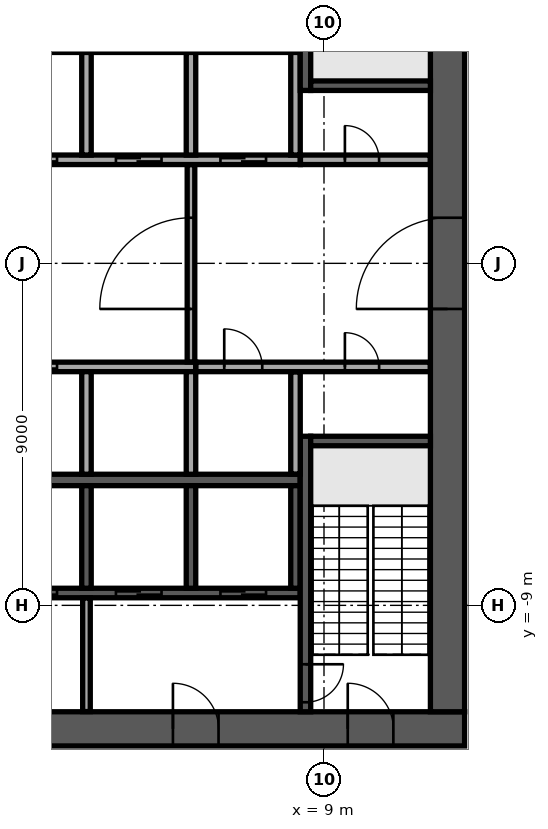
"""IFC4 building model, lengths in metres.
Left out: names, types, materials, properties, quantities, classifications, styles, units other than length and angle.
Written with IfcOpenShell. Run it as: python <this file> out.ifc"""

import sys

from ifc_helpers import new_model, si_unit, direction, frame, frame_2d, origin, place, context, subcontext, project, spatial, rectangle, extrude, element, fill, save


model = new_model("IFC4")
c1 = context("Model", 3, precision=1e-05, world=origin(), true_north=direction((0.0, 1.0)))
c2 = subcontext(c1, "Body", "Model", "MODEL_VIEW")
j1 = project(units=[si_unit("LENGTHUNIT", "METRE"), si_unit("PLANEANGLEUNIT", "RADIAN")], contexts=[c1])
p1 = place(None, origin())
s1 = spatial("IfcSite", under=j1, at=p1, CompositionType="ELEMENT")
p2 = place(p1, origin())
s2 = spatial("IfcBuilding", under=s1, at=p2, CompositionType="ELEMENT")
p3 = place(p2, frame((0.0, 0.0, 237.3)))
s3 = spatial("IfcBuildingStorey", under=s2, at=p3, CompositionType="ELEMENT", Elevation=237.3)
p4 = place(p3, frame((-12.7, -12.25, 0.0), z_axis=(0.0, 0.0, 1.0), x_axis=(1.0, 0.0, 0.0)))
e1 = element("IfcWall", 1, at=p4, inside=s3, PredefinedType="SHEAR", context=c2, shape_type="SweptSolid", body=[
    extrude(rectangle(XDim=25.4, YDim=0.9, at=frame_2d((12.7, 0.0))), origin(), (0.0, 0.0, 1.0), 5.24),
])
p5 = place(p4, frame((7.6, 0.0, 0.0)))
e2 = element("IfcOpeningElement", 2, at=p5, cuts=e1, PredefinedType="OPENING", context=c2, shape_type="SweptSolid", body=[
    extrude(rectangle(XDim=2.0, YDim=2.1, at=frame_2d((1.0, 1.05))), frame((0.0, 0.46, 0.0), z_axis=(0.0, -1.0, 0.0), x_axis=(1.0, 0.0, 0.0)), (0.0, 0.0, 1.0), 0.92),
])
p6 = place(p4, frame((17.725, 0.0, 0.0)))
e3 = element("IfcOpeningElement", 3, at=p6, cuts=e1, PredefinedType="OPENING", context=c2, shape_type="SweptSolid", body=[
    extrude(rectangle(XDim=1.2, YDim=2.1, at=frame_2d((0.6, 1.05))), frame((0.0, 0.46, 0.0), z_axis=(0.0, -1.0, 0.0), x_axis=(1.0, 0.0, 0.0)), (0.0, 0.0, 1.0), 0.92),
])
p7 = place(p4, frame((1.875, 0.0, 0.0)))
e4 = element("IfcOpeningElement", 4, at=p7, cuts=e1, PredefinedType="OPENING", context=c2, shape_type="SweptSolid", body=[
    extrude(rectangle(XDim=1.2, YDim=2.1, at=frame_2d((0.6, 1.05))), frame((0.0, 0.46, 0.0), z_axis=(0.0, -1.0, 0.0), x_axis=(1.0, 0.0, 0.0)), (0.0, 0.0, 1.0), 0.92),
])
p8 = place(p4, frame((22.325, 0.0, 0.0)))
e5 = element("IfcOpeningElement", 5, at=p8, cuts=e1, PredefinedType="OPENING", context=c2, shape_type="SweptSolid", body=[
    extrude(rectangle(XDim=1.2, YDim=2.1, at=frame_2d((0.6, 1.05))), frame((0.0, 0.46, 0.0), z_axis=(0.0, -1.0, 0.0), x_axis=(1.0, 0.0, 0.0)), (0.0, 0.0, 1.0), 0.92),
])
p9 = place(p3, frame((12.25, -11.8, 0.0), z_axis=(0.0, 0.0, 1.0), x_axis=(0.0, 1.0, 0.0)))
e6 = element("IfcWall", 6, at=p9, inside=s3, PredefinedType="SHEAR", context=c2, shape_type="SweptSolid", body=[
    extrude(rectangle(XDim=23.6, YDim=0.9, at=frame_2d((11.8, 0.0))), origin(), (0.0, 0.0, 1.0), 5.24),
])
p10 = place(p9, frame((10.6, 0.0, 0.0)))
e7 = element("IfcOpeningElement", 7, at=p10, cuts=e6, PredefinedType="OPENING", context=c2, shape_type="SweptSolid", body=[
    extrude(rectangle(XDim=2.4, YDim=2.4, at=frame_2d((1.2, 1.2))), frame((0.0, 0.46, 0.0), z_axis=(0.0, -1.0, 0.0), x_axis=(1.0, 0.0, 0.0)), (0.0, 0.0, 1.0), 0.92),
])
p11 = place(p3, frame((-8.375, 5.7, 0.0), z_axis=(0.0, 0.0, 1.0), x_axis=(1.0, 0.0, 0.0)))
e8 = element("IfcWall", 8, at=p11, inside=s3, PredefinedType="SOLIDWALL", context=c2, shape_type="SweptSolid", body=[
    extrude(rectangle(XDim=16.75, YDim=0.3, at=frame_2d((8.375, 0.0))), origin(), (0.0, 0.0, 1.0), 5.24),
])
p12 = place(p3, frame((-2.875, -5.7, 0.0), z_axis=(0.0, 0.0, 1.0), x_axis=(1.0, 0.0, 0.0)))
e9 = element("IfcWall", 9, at=p12, inside=s3, PredefinedType="SOLIDWALL", context=c2, shape_type="SweptSolid", body=[
    extrude(rectangle(XDim=11.25, YDim=0.3, at=frame_2d((5.625, 0.0))), origin(), (0.0, 0.0, 1.0), 5.24),
])
p13 = place(p3, frame((-8.375, 2.725, 0.0), z_axis=(0.0, 0.0, 1.0), x_axis=(1.0, 0.0, 0.0)))
e10 = element("IfcWall", 10, at=p13, inside=s3, PredefinedType="SOLIDWALL", context=c2, shape_type="SweptSolid", body=[
    extrude(rectangle(XDim=16.75, YDim=0.25, at=frame_2d((8.375, 0.0))), origin(), (0.0, 0.0, 1.0), 5.24),
])
p14 = place(p13, frame((0.9, 0.0, 0.0)))
e11 = element("IfcOpeningElement", 11, at=p14, cuts=e10, PredefinedType="OPENING", context=c2, shape_type="SweptSolid", body=[
    extrude(rectangle(XDim=1.2, YDim=2.1, at=frame_2d((0.6, 1.05))), frame((0.0, 0.135, 0.0), z_axis=(0.0, -1.0, 0.0), x_axis=(1.0, 0.0, 0.0)), (0.0, 0.0, 1.0), 0.27),
])
p15 = place(p13, frame((3.65, 0.0, 0.0)))
e12 = element("IfcOpeningElement", 12, at=p15, cuts=e10, PredefinedType="OPENING", context=c2, shape_type="SweptSolid", body=[
    extrude(rectangle(XDim=1.2, YDim=2.1, at=frame_2d((0.6, 1.05))), frame((0.0, 0.135, 0.0), z_axis=(0.0, -1.0, 0.0), x_axis=(1.0, 0.0, 0.0)), (0.0, 0.0, 1.0), 0.27),
])
p16 = place(p13, frame((6.4, 0.0, 0.0)))
e13 = element("IfcOpeningElement", 13, at=p16, cuts=e10, PredefinedType="OPENING", context=c2, shape_type="SweptSolid", body=[
    extrude(rectangle(XDim=1.2, YDim=2.1, at=frame_2d((0.6, 1.05))), frame((0.0, 0.135, 0.0), z_axis=(0.0, -1.0, 0.0), x_axis=(1.0, 0.0, 0.0)), (0.0, 0.0, 1.0), 0.27),
])
p17 = place(p13, frame((9.15, 0.0, 0.0)))
e14 = element("IfcOpeningElement", 14, at=p17, cuts=e10, PredefinedType="OPENING", context=c2, shape_type="SweptSolid", body=[
    extrude(rectangle(XDim=1.2, YDim=2.1, at=frame_2d((0.6, 1.05))), frame((0.0, 0.135, 0.0), z_axis=(0.0, -1.0, 0.0), x_axis=(1.0, 0.0, 0.0)), (0.0, 0.0, 1.0), 0.27),
])
p18 = place(p13, frame((11.9, 0.0, 0.0)))
e15 = element("IfcOpeningElement", 15, at=p18, cuts=e10, PredefinedType="OPENING", context=c2, shape_type="SweptSolid", body=[
    extrude(rectangle(XDim=1.2, YDim=2.1, at=frame_2d((0.6, 1.05))), frame((0.0, 0.135, 0.0), z_axis=(0.0, -1.0, 0.0), x_axis=(1.0, 0.0, 0.0)), (0.0, 0.0, 1.0), 0.27),
])
p19 = place(p13, frame((14.65, 0.0, 0.0)))
e16 = element("IfcOpeningElement", 16, at=p19, cuts=e10, PredefinedType="OPENING", context=c2, shape_type="SweptSolid", body=[
    extrude(rectangle(XDim=1.2, YDim=2.1, at=frame_2d((0.6, 1.05))), frame((0.0, 0.135, 0.0), z_axis=(0.0, -1.0, 0.0), x_axis=(1.0, 0.0, 0.0)), (0.0, 0.0, 1.0), 0.27),
])
for number, where, z_axis, x_axis in (
    (17, (2.75, 2.85, 0.0), (0.0, 0.0, 1.0), (0.0, 1.0, 0.0)),
    (18, (5.5, 2.85, 0.0), (0.0, 0.0, 1.0), (0.0, 1.0, 0.0)),
    (19, (8.25, 2.85, 0.0), (0.0, 0.0, 1.0), (0.0, 1.0, 0.0)),
):
    element("IfcWall", number, at=place(p3, frame(where, z_axis=z_axis, x_axis=x_axis)), inside=s3, PredefinedType="SOLIDWALL", context=c2, shape_type="SweptSolid", body=[
        extrude(rectangle(XDim=2.7, YDim=0.25, at=frame_2d((1.35, 0.0))), origin(), (0.0, 0.0, 1.0), 5.24),
    ])
p20 = place(p3, frame((-2.875, -2.725, 0.0), z_axis=(0.0, 0.0, 1.0), x_axis=(1.0, 0.0, 0.0)))
e20 = element("IfcWall", 20, at=p20, inside=s3, PredefinedType="SOLIDWALL", context=c2, shape_type="SweptSolid", body=[
    extrude(rectangle(XDim=8.5, YDim=0.25, at=frame_2d((4.25, 0.0))), origin(), (0.0, 0.0, 1.0), 5.24),
])
p21 = place(p20, frame((0.9, 0.0, 0.0)))
e21 = element("IfcOpeningElement", 21, at=p21, cuts=e20, PredefinedType="OPENING", context=c2, shape_type="SweptSolid", body=[
    extrude(rectangle(XDim=1.2, YDim=2.1, at=frame_2d((0.6, 1.05))), frame((0.0, 0.135, 0.0), z_axis=(0.0, -1.0, 0.0), x_axis=(1.0, 0.0, 0.0)), (0.0, 0.0, 1.0), 0.27),
])
p22 = place(p20, frame((3.65, 0.0, 0.0)))
e22 = element("IfcOpeningElement", 22, at=p22, cuts=e20, PredefinedType="OPENING", context=c2, shape_type="SweptSolid", body=[
    extrude(rectangle(XDim=1.2, YDim=2.1, at=frame_2d((0.6, 1.05))), frame((0.0, 0.135, 0.0), z_axis=(0.0, -1.0, 0.0), x_axis=(1.0, 0.0, 0.0)), (0.0, 0.0, 1.0), 0.27),
])
for number, where, z_axis, x_axis in (
    (23, (2.75, -5.55, 0.0), (0.0, 0.0, 1.0), (0.0, 1.0, 0.0)),
    (24, (5.5, -5.55, 0.0), (0.0, 0.0, 1.0), (0.0, 1.0, 0.0)),
):
    element("IfcWall", number, at=place(p3, frame(where, z_axis=z_axis, x_axis=x_axis)), inside=s3, PredefinedType="SOLIDWALL", context=c2, shape_type="SweptSolid", body=[
        extrude(rectangle(XDim=2.7, YDim=0.25, at=frame_2d((1.35, 0.0))), origin(), (0.0, 0.0, 1.0), 5.24),
    ])
p23 = place(p3, frame((-2.875, -8.675, 0.0), z_axis=(0.0, 0.0, 1.0), x_axis=(1.0, 0.0, 0.0)))
e25 = element("IfcWall", 25, at=p23, inside=s3, PredefinedType="SOLIDWALL", context=c2, shape_type="SweptSolid", body=[
    extrude(rectangle(XDim=11.25, YDim=0.25, at=frame_2d((5.625, 0.0))), origin(), (0.0, 0.0, 1.0), 5.24),
])
p24 = place(p23, frame((0.9, 0.0, 0.0)))
e26 = element("IfcOpeningElement", 26, at=p24, cuts=e25, PredefinedType="OPENING", context=c2, shape_type="SweptSolid", body=[
    extrude(rectangle(XDim=1.2, YDim=2.1, at=frame_2d((0.6, 1.05))), frame((0.0, 0.135, 0.0), z_axis=(0.0, -1.0, 0.0), x_axis=(1.0, 0.0, 0.0)), (0.0, 0.0, 1.0), 0.27),
])
p25 = place(p23, frame((3.65, 0.0, 0.0)))
e27 = element("IfcOpeningElement", 27, at=p25, cuts=e25, PredefinedType="OPENING", context=c2, shape_type="SweptSolid", body=[
    extrude(rectangle(XDim=1.2, YDim=2.1, at=frame_2d((0.6, 1.05))), frame((0.0, 0.135, 0.0), z_axis=(0.0, -1.0, 0.0), x_axis=(1.0, 0.0, 0.0)), (0.0, 0.0, 1.0), 0.27),
])
p26 = place(p23, frame((6.4, 0.0, 0.0)))
e28 = element("IfcOpeningElement", 28, at=p26, cuts=e25, PredefinedType="OPENING", context=c2, shape_type="SweptSolid", body=[
    extrude(rectangle(XDim=1.2, YDim=2.1, at=frame_2d((0.6, 1.05))), frame((0.0, 0.135, 0.0), z_axis=(0.0, -1.0, 0.0), x_axis=(1.0, 0.0, 0.0)), (0.0, 0.0, 1.0), 0.27),
])
p27 = place(p23, frame((9.15, 0.0, 0.0)))
e29 = element("IfcOpeningElement", 29, at=p27, cuts=e25, PredefinedType="OPENING", context=c2, shape_type="SweptSolid", body=[
    extrude(rectangle(XDim=1.2, YDim=2.1, at=frame_2d((0.6, 1.05))), frame((0.0, 0.135, 0.0), z_axis=(0.0, -1.0, 0.0), x_axis=(1.0, 0.0, 0.0)), (0.0, 0.0, 1.0), 0.27),
])
for number, where, z_axis, x_axis in (
    (30, (2.75, -8.55, 0.0), (0.0, 0.0, 1.0), (0.0, 1.0, 0.0)),
    (31, (5.5, -8.55, 0.0), (0.0, 0.0, 1.0), (0.0, 1.0, 0.0)),
    (32, (8.25, -8.55, 0.0), (0.0, 0.0, 1.0), (0.0, 1.0, 0.0)),
):
    element("IfcWall", number, at=place(p3, frame(where, z_axis=z_axis, x_axis=x_axis)), inside=s3, PredefinedType="SOLIDWALL", context=c2, shape_type="SweptSolid", body=[
        extrude(rectangle(XDim=2.7, YDim=0.25, at=frame_2d((1.35, 0.0))), origin(), (0.0, 0.0, 1.0), 5.24),
    ])
p28 = place(p3, frame((8.512, 4.55, 0.0), z_axis=(0.0, 0.0, 1.0), x_axis=(0.0, 1.0, 0.0)))
e33 = element("IfcWall", 33, at=p28, inside=s3, PredefinedType="SOLIDWALL", context=c2, shape_type="SweptSolid", body=[
    extrude(rectangle(XDim=7.25, YDim=0.275, at=frame_2d((3.625, 0.0))), origin(), (0.0, 0.0, 1.0), 5.24),
])
p29 = place(p28, frame((6.0, 0.0, 0.0)))
e34 = element("IfcOpeningElement", 34, at=p29, cuts=e33, PredefinedType="OPENING", context=c2, shape_type="SweptSolid", body=[
    extrude(rectangle(XDim=1.0, YDim=2.1, at=frame_2d((0.5, 1.05))), frame((0.0, 0.147, 0.0), z_axis=(0.0, -1.0, 0.0), x_axis=(1.0, 0.0, 0.0)), (0.0, 0.0, 1.0), 0.295),
])
p30 = place(p3, frame((8.65, 4.675, 0.0), z_axis=(0.0, 0.0, 1.0), x_axis=(1.0, 0.0, 0.0)))
e35 = element("IfcWall", 35, at=p30, inside=s3, PredefinedType="SOLIDWALL", context=c2, shape_type="SweptSolid", body=[
    extrude(rectangle(XDim=3.15, YDim=0.25, at=frame_2d((1.575, 0.0))), origin(), (0.0, 0.0, 1.0), 5.24),
])
p31 = place(p3, frame((8.512, -4.55, 0.0), z_axis=(0.0, 0.0, 1.0), x_axis=(0.0, -1.0, 0.0)))
e36 = element("IfcWall", 36, at=p31, inside=s3, PredefinedType="SOLIDWALL", context=c2, shape_type="SweptSolid", body=[
    extrude(rectangle(XDim=7.25, YDim=0.275, at=frame_2d((3.625, 0.0))), origin(), (0.0, 0.0, 1.0), 5.24),
])
p32 = place(p31, frame((6.0, 0.0, 0.0)))
e37 = element("IfcOpeningElement", 37, at=p32, cuts=e36, PredefinedType="OPENING", context=c2, shape_type="SweptSolid", body=[
    extrude(rectangle(XDim=1.0, YDim=2.1, at=frame_2d((0.5, 1.05))), frame((0.0, 0.147, 0.0), z_axis=(0.0, -1.0, 0.0), x_axis=(1.0, 0.0, 0.0)), (0.0, 0.0, 1.0), 0.295),
])
p33 = place(p3, frame((8.65, -4.675, 0.0), z_axis=(0.0, 0.0, 1.0), x_axis=(1.0, 0.0, 0.0)))
e38 = element("IfcWall", 38, at=p33, inside=s3, PredefinedType="SOLIDWALL", context=c2, shape_type="SweptSolid", body=[
    extrude(rectangle(XDim=3.15, YDim=0.25, at=frame_2d((1.575, 0.0))), origin(), (0.0, 0.0, 1.0), 5.24),
])
p34 = place(p3, frame((2.75, -11.795, 0.0), z_axis=(0.0, 0.0, 1.0), x_axis=(0.0, 1.0, 0.0)))
e39 = element("IfcWall", 39, at=p34, inside=s3, PredefinedType="PARTITIONING", context=c2, shape_type="SweptSolid", body=[
    extrude(rectangle(XDim=2.99, YDim=0.2, at=frame_2d((1.495, 0.0))), origin(), (0.0, 0.0, 1.0), 5.24),
])
p35 = place(p3, frame((8.25, -5.545, 0.0), z_axis=(0.0, 0.0, 1.0), x_axis=(0.0, 1.0, 0.0)))
e40 = element("IfcWall", 40, at=p35, inside=s3, PredefinedType="PARTITIONING", context=c2, shape_type="SweptSolid", body=[
    extrude(rectangle(XDim=2.69, YDim=0.25, at=frame_2d((1.345, 0.0))), origin(), (0.0, 0.0, 1.0), 5.24),
])
p36 = place(p3, frame((5.63, -2.725, 0.0), z_axis=(0.0, 0.0, 1.0), x_axis=(1.0, 0.0, 0.0)))
e41 = element("IfcWall", 41, at=p36, inside=s3, PredefinedType="PARTITIONING", context=c2, shape_type="SweptSolid", body=[
    extrude(rectangle(XDim=6.165, YDim=0.25, at=frame_2d((3.083, 0.0))), origin(), (0.0, 0.0, 1.0), 5.24),
])
p37 = place(p36, frame((0.745, 0.0, 0.0)))
e42 = element("IfcOpeningElement", 42, at=p37, cuts=e41, PredefinedType="OPENING", context=c2, shape_type="SweptSolid", body=[
    extrude(rectangle(XDim=1.0, YDim=2.1, at=frame_2d((0.5, 1.05))), frame((0.0, 0.135, 0.0), z_axis=(0.0, -1.0, 0.0), x_axis=(1.0, 0.0, 0.0)), (0.0, 0.0, 1.0), 0.27),
])
p38 = place(p36, frame((3.92, 0.0, 0.0)))
e43 = element("IfcOpeningElement", 43, at=p38, cuts=e41, PredefinedType="OPENING", context=c2, shape_type="SweptSolid", body=[
    extrude(rectangle(XDim=0.9, YDim=2.1, at=frame_2d((0.45, 1.05))), frame((0.0, 0.135, 0.0), z_axis=(0.0, -1.0, 0.0), x_axis=(1.0, 0.0, 0.0)), (0.0, 0.0, 1.0), 0.27),
])
p39 = place(p3, frame((5.5, -2.595, 0.0), z_axis=(0.0, 0.0, 1.0), x_axis=(0.0, 1.0, 0.0)))
e44 = element("IfcWall", 44, at=p39, inside=s3, PredefinedType="PARTITIONING", context=c2, shape_type="SweptSolid", body=[
    extrude(rectangle(XDim=5.19, YDim=0.2, at=frame_2d((2.595, 0.0))), origin(), (0.0, 0.0, 1.0), 5.24),
])
p40 = place(p39, frame((1.395, 0.0, 0.0)))
e45 = element("IfcOpeningElement", 45, at=p40, cuts=e44, PredefinedType="OPENING", context=c2, shape_type="SweptSolid", body=[
    extrude(rectangle(XDim=2.4, YDim=2.4, at=frame_2d((1.2, 1.2))), frame((0.0, 0.11, 0.0), z_axis=(0.0, -1.0, 0.0), x_axis=(1.0, 0.0, 0.0)), (0.0, 0.0, 1.0), 0.22),
])
p41 = place(p3, frame((8.38, 2.725, 0.0), z_axis=(0.0, 0.0, 1.0), x_axis=(1.0, 0.0, 0.0)))
e46 = element("IfcWall", 46, at=p41, inside=s3, PredefinedType="PARTITIONING", context=c2, shape_type="SweptSolid", body=[
    extrude(rectangle(XDim=3.415, YDim=0.25, at=frame_2d((1.708, 0.0))), origin(), (0.0, 0.0, 1.0), 5.24),
])
p42 = place(p41, frame((1.17, 0.0, 0.0)))
e47 = element("IfcOpeningElement", 47, at=p42, cuts=e46, PredefinedType="OPENING", context=c2, shape_type="SweptSolid", body=[
    extrude(rectangle(XDim=0.9, YDim=2.1, at=frame_2d((0.45, 1.05))), frame((0.0, 0.135, 0.0), z_axis=(0.0, -1.0, 0.0), x_axis=(1.0, 0.0, 0.0)), (0.0, 0.0, 1.0), 0.27),
])
p43 = place(p6, origin())
e48 = element("IfcDoor", 48, at=p43, inside=s3, OperationType="SINGLE_SWING_LEFT", PredefinedType="DOOR", context=c2, shape_type="SweptSolid", body=[
    extrude(rectangle(XDim=1.2, YDim=2.1, at=frame_2d((0.6, 1.05))), frame((0.0, 0.025, 0.0), z_axis=(0.0, -1.0, 0.0), x_axis=(1.0, 0.0, 0.0)), (0.0, 0.0, 1.0), 0.05),
])
fill(e3, e48)
p44 = place(p8, origin())
e49 = element("IfcDoor", 49, at=p44, inside=s3, OperationType="SINGLE_SWING_LEFT", PredefinedType="DOOR", context=c2, shape_type="SweptSolid", body=[
    extrude(rectangle(XDim=1.2, YDim=2.1, at=frame_2d((0.6, 1.05))), frame((0.0, 0.025, 0.0), z_axis=(0.0, -1.0, 0.0), x_axis=(1.0, 0.0, 0.0)), (0.0, 0.0, 1.0), 0.05),
])
fill(e5, e49)
p45 = place(p10, origin())
e50 = element("IfcDoor", 50, at=p45, inside=s3, OperationType="SINGLE_SWING_LEFT", PredefinedType="DOOR", context=c2, shape_type="SweptSolid", body=[
    extrude(rectangle(XDim=2.4, YDim=2.4, at=frame_2d((1.2, 1.2))), frame((0.0, 0.025, 0.0), z_axis=(0.0, -1.0, 0.0), x_axis=(1.0, 0.0, 0.0)), (0.0, 0.0, 1.0), 0.05),
])
fill(e7, e50)
p46 = place(p17, origin())
e51 = element("IfcDoor", 51, at=p46, inside=s3, OperationType="DOUBLE_DOOR_SLIDING", PredefinedType="DOOR", context=c2, shape_type="SweptSolid", body=[
    extrude(rectangle(XDim=1.2, YDim=2.1, at=frame_2d((0.6, 1.05))), frame((0.0, 0.025, 0.0), z_axis=(0.0, -1.0, 0.0), x_axis=(1.0, 0.0, 0.0)), (0.0, 0.0, 1.0), 0.05),
])
fill(e14, e51)
p47 = place(p18, origin())
e52 = element("IfcDoor", 52, at=p47, inside=s3, OperationType="DOUBLE_DOOR_SLIDING", PredefinedType="DOOR", context=c2, shape_type="SweptSolid", body=[
    extrude(rectangle(XDim=1.2, YDim=2.1, at=frame_2d((0.6, 1.05))), frame((0.0, 0.025, 0.0), z_axis=(0.0, -1.0, 0.0), x_axis=(1.0, 0.0, 0.0)), (0.0, 0.0, 1.0), 0.05),
])
fill(e15, e52)
p48 = place(p19, origin())
e53 = element("IfcDoor", 53, at=p48, inside=s3, OperationType="DOUBLE_DOOR_SLIDING", PredefinedType="DOOR", context=c2, shape_type="SweptSolid", body=[
    extrude(rectangle(XDim=1.2, YDim=2.1, at=frame_2d((0.6, 1.05))), frame((0.0, 0.025, 0.0), z_axis=(0.0, -1.0, 0.0), x_axis=(1.0, 0.0, 0.0)), (0.0, 0.0, 1.0), 0.05),
])
fill(e16, e53)
p49 = place(p22, origin())
e54 = element("IfcDoor", 54, at=p49, inside=s3, OperationType="DOUBLE_DOOR_SLIDING", PredefinedType="DOOR", context=c2, shape_type="SweptSolid", body=[
    extrude(rectangle(XDim=1.2, YDim=2.1, at=frame_2d((0.6, 1.05))), frame((0.0, 0.025, 0.0), z_axis=(0.0, -1.0, 0.0), x_axis=(1.0, 0.0, 0.0)), (0.0, 0.0, 1.0), 0.05),
])
fill(e22, e54)
p50 = place(p25, origin())
e55 = element("IfcDoor", 55, at=p50, inside=s3, OperationType="DOUBLE_DOOR_SLIDING", PredefinedType="DOOR", context=c2, shape_type="SweptSolid", body=[
    extrude(rectangle(XDim=1.2, YDim=2.1, at=frame_2d((0.6, 1.05))), frame((0.0, 0.025, 0.0), z_axis=(0.0, -1.0, 0.0), x_axis=(1.0, 0.0, 0.0)), (0.0, 0.0, 1.0), 0.05),
])
fill(e27, e55)
p51 = place(p26, origin())
e56 = element("IfcDoor", 56, at=p51, inside=s3, OperationType="DOUBLE_DOOR_SLIDING", PredefinedType="DOOR", context=c2, shape_type="SweptSolid", body=[
    extrude(rectangle(XDim=1.2, YDim=2.1, at=frame_2d((0.6, 1.05))), frame((0.0, 0.025, 0.0), z_axis=(0.0, -1.0, 0.0), x_axis=(1.0, 0.0, 0.0)), (0.0, 0.0, 1.0), 0.05),
])
fill(e28, e56)
p52 = place(p27, origin())
e57 = element("IfcDoor", 57, at=p52, inside=s3, OperationType="DOUBLE_DOOR_SLIDING", PredefinedType="DOOR", context=c2, shape_type="SweptSolid", body=[
    extrude(rectangle(XDim=1.2, YDim=2.1, at=frame_2d((0.6, 1.05))), frame((0.0, 0.025, 0.0), z_axis=(0.0, -1.0, 0.0), x_axis=(1.0, 0.0, 0.0)), (0.0, 0.0, 1.0), 0.05),
])
fill(e29, e57)
p53 = place(p32, origin())
e58 = element("IfcDoor", 58, at=p53, inside=s3, OperationType="SINGLE_SWING_LEFT", PredefinedType="DOOR", context=c2, shape_type="SweptSolid", body=[
    extrude(rectangle(XDim=1.0, YDim=2.1, at=frame_2d((0.5, 1.05))), frame((0.0, 0.025, 0.0), z_axis=(0.0, -1.0, 0.0), x_axis=(1.0, 0.0, 0.0)), (0.0, 0.0, 1.0), 0.05),
])
fill(e37, e58)
p54 = place(p37, origin())
e59 = element("IfcDoor", 59, at=p54, inside=s3, OperationType="SINGLE_SWING_LEFT", PredefinedType="DOOR", context=c2, shape_type="SweptSolid", body=[
    extrude(rectangle(XDim=1.0, YDim=2.1, at=frame_2d((0.5, 1.05))), frame((0.0, 0.025, 0.0), z_axis=(0.0, -1.0, 0.0), x_axis=(1.0, 0.0, 0.0)), (0.0, 0.0, 1.0), 0.05),
])
fill(e42, e59)
p55 = place(p42, origin())
e60 = element("IfcDoor", 60, at=p55, inside=s3, OperationType="SINGLE_SWING_LEFT", PredefinedType="DOOR", context=c2, shape_type="SweptSolid", body=[
    extrude(rectangle(XDim=0.9, YDim=2.1, at=frame_2d((0.45, 1.05))), frame((0.0, 0.025, 0.0), z_axis=(0.0, -1.0, 0.0), x_axis=(1.0, 0.0, 0.0)), (0.0, 0.0, 1.0), 0.05),
])
fill(e47, e60)
p56 = place(p38, origin())
e61 = element("IfcDoor", 61, at=p56, inside=s3, OperationType="SINGLE_SWING_LEFT", PredefinedType="DOOR", context=c2, shape_type="SweptSolid", body=[
    extrude(rectangle(XDim=0.9, YDim=2.1, at=frame_2d((0.45, 1.05))), frame((0.0, 0.025, 0.0), z_axis=(0.0, -1.0, 0.0), x_axis=(1.0, 0.0, 0.0)), (0.0, 0.0, 1.0), 0.05),
])
fill(e43, e61)
p57 = place(p40, origin())
e62 = element("IfcDoor", 62, at=p57, inside=s3, OperationType="SINGLE_SWING_LEFT", PredefinedType="DOOR", context=c2, shape_type="SweptSolid", body=[
    extrude(rectangle(XDim=2.4, YDim=2.4, at=frame_2d((1.2, 1.2))), frame((0.0, 0.025, 0.0), z_axis=(0.0, -1.0, 0.0), x_axis=(1.0, 0.0, 0.0)), (0.0, 0.0, 1.0), 0.05),
])
fill(e45, e62)
save(model, sys.argv[1])
